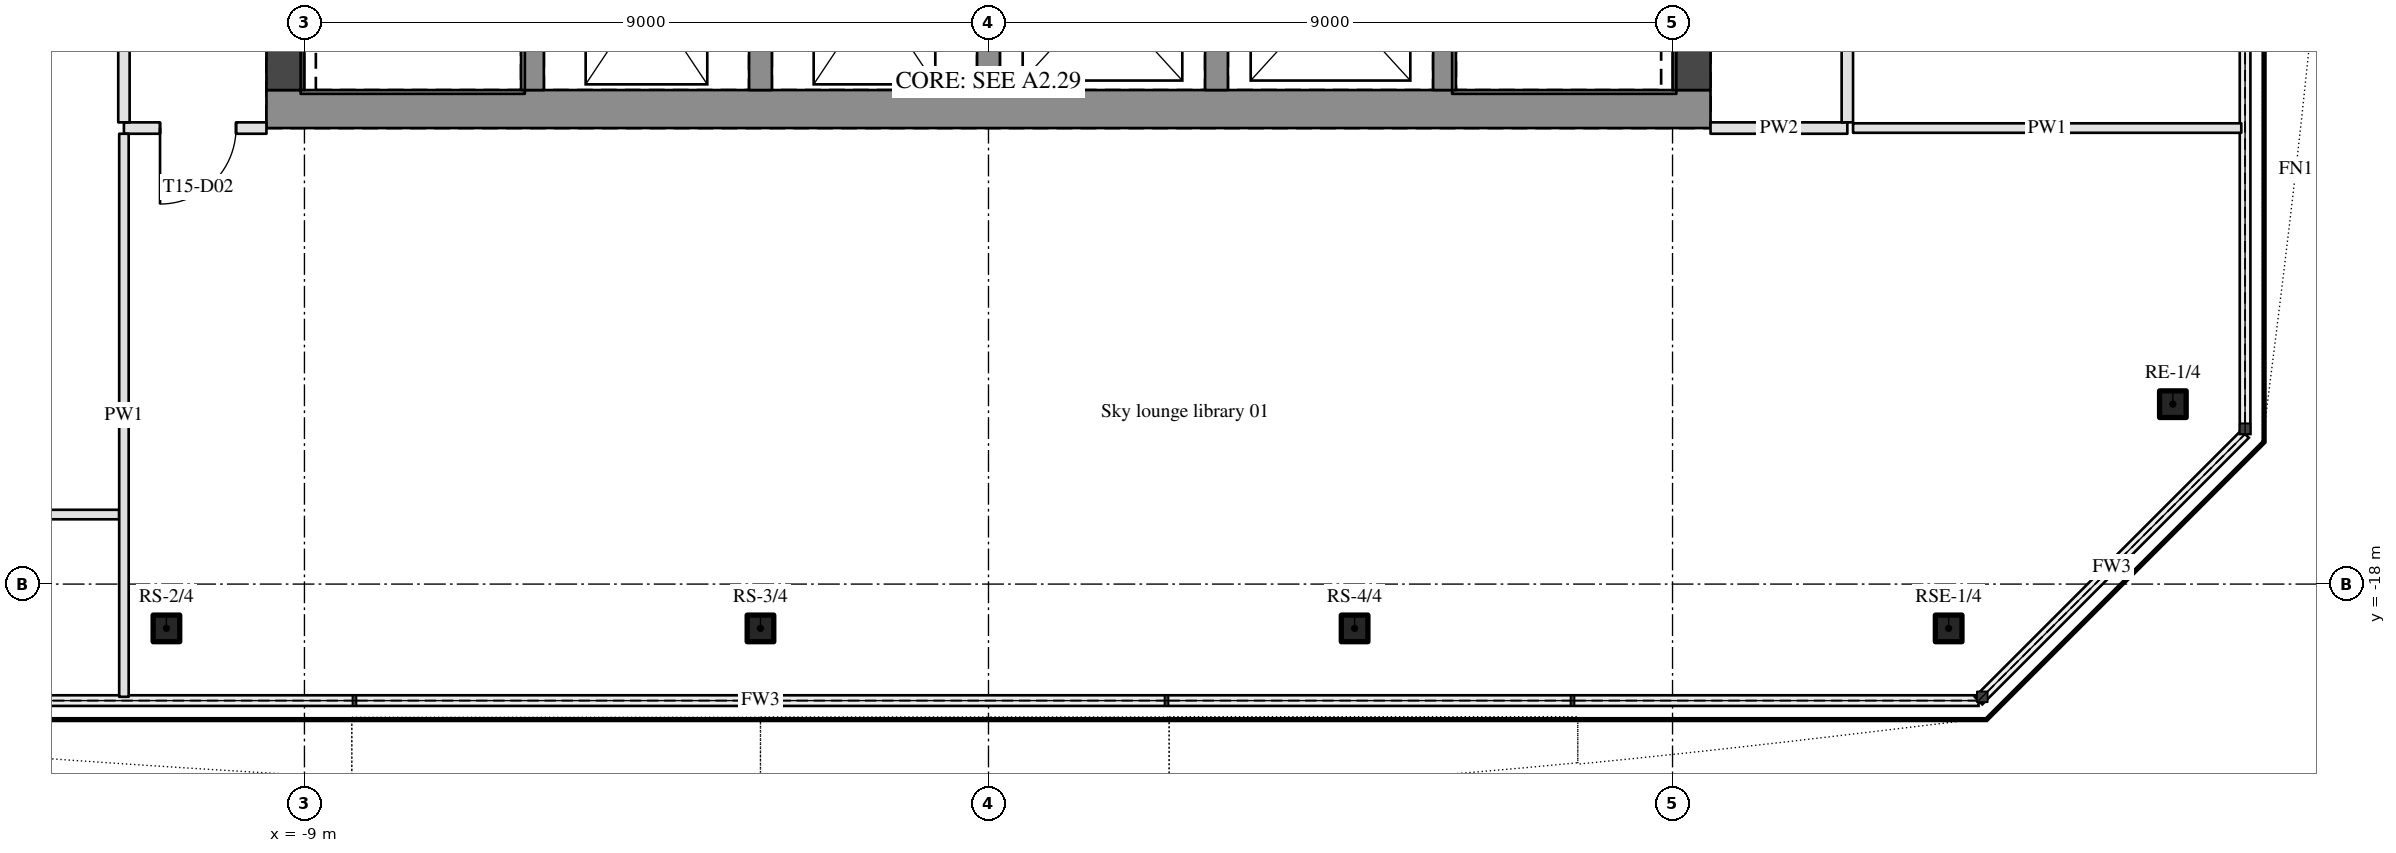
"""IFC4 building model, lengths in metres.
Left out: names, types, materials, properties, quantities, classifications, styles, units other than length and angle.
Written with IfcOpenShell. Run it as: python <this file> out.ifc"""

import sys

from ifc_helpers import new_model, si_unit, direction, frame, frame_2d, origin, origin_2d, place, context, subcontext, project, spatial, rectangle, hollow_rectangle, extrude, element, fill, save


model = new_model("IFC4")
c1 = context("Model", 3, precision=1e-05, world=origin(), true_north=direction((0.0, 1.0)))
c2 = subcontext(c1, "Body", "Model", "MODEL_VIEW")
j1 = project(units=[si_unit("LENGTHUNIT", "METRE"), si_unit("PLANEANGLEUNIT", "RADIAN")], contexts=[c1])
p1 = place(None, origin())
s1 = spatial("IfcSite", under=j1, at=p1, CompositionType="ELEMENT")
p2 = place(p1, origin())
s2 = spatial("IfcBuilding", under=s1, at=p2, CompositionType="ELEMENT")
p3 = place(p2, frame((0.0, 0.0, 206.85)))
s3 = spatial("IfcBuildingStorey", under=s2, at=p3, CompositionType="ELEMENT", Elevation=206.85)
for number, where, z_axis, x_axis in (
    (1, (-10.816, -18.583, 0.0), (0.0, 0.0, 1.0), (1.0, 0.0, 0.0)),
    (2, (-3.0, -18.583, 0.0), (0.0, 0.0, 1.0), (1.0, 0.0, 0.0)),
    (3, (4.817, -18.583, 0.0), (0.0, 0.0, 1.0), (1.0, 0.0, 0.0)),
    (4, (12.633, -18.583, 0.0), (0.0, 0.0, 1.0), (1.0, 0.0, 0.0)),
    (5, (15.583, -15.633, 0.0), (0.0, 0.0, 1.0), (1.0, 0.0, 0.0)),
):
    element("IfcColumn", number, at=place(p3, frame(where, z_axis=z_axis, x_axis=x_axis)), inside=s3, PredefinedType="COLUMN", context=c2, shape_type="SweptSolid", body=[
        extrude(hollow_rectangle(XDim=0.35, YDim=0.35, WallThickness=0.02, InnerFilletRadius=0.03, OuterFilletRadius=0.05, at=origin_2d()), origin(), (0.0, 0.0, 1.0), 3.15),
    ])
p4 = place(p3, frame((-9.5, -11.75, 0.0), z_axis=(0.0, 0.0, 1.0), x_axis=(1.0, 0.0, 0.0)))
e6 = element("IfcWall", 6, at=p4, inside=s3, PredefinedType="SHEAR", context=c2, shape_type="SweptSolid", body=[
    extrude(rectangle(XDim=19.0, YDim=0.5, at=frame_2d((9.5, 0.0))), origin(), (0.0, 0.0, 1.0), 3.15),
])
p5 = place(p3, frame((-9.25, -11.5, 0.0), z_axis=(0.0, 0.0, 1.0), x_axis=(0.0, 1.0, 0.0)))
e7 = element("IfcWall", 7, at=p5, inside=s3, PredefinedType="SHEAR", context=c2, shape_type="SweptSolid", body=[
    extrude(rectangle(XDim=11.65, YDim=0.5, at=frame_2d((5.825, 0.0))), origin(), (0.0, 0.0, 1.0), 3.15),
])
p6 = place(p5, frame((9.4, 0.0, 0.0)))
e8 = element("IfcOpeningElement", 8, at=p6, cuts=e7, PredefinedType="OPENING", context=c2, shape_type="SweptSolid", body=[
    extrude(rectangle(XDim=1.8, YDim=2.1, at=frame_2d((0.9, 1.05))), frame((0.0, 0.26, 0.0), z_axis=(0.0, -1.0, 0.0), x_axis=(1.0, 0.0, 0.0)), (0.0, 0.0, 1.0), 0.52),
])
p7 = place(p3, frame((9.25, -11.5, 0.0), z_axis=(0.0, 0.0, 1.0), x_axis=(0.0, 1.0, 0.0)))
e9 = element("IfcWall", 9, at=p7, inside=s3, PredefinedType="SHEAR", context=c2, shape_type="SweptSolid", body=[
    extrude(rectangle(XDim=11.65, YDim=0.5, at=frame_2d((5.825, 0.0))), origin(), (0.0, 0.0, 1.0), 3.15),
])
p8 = place(p7, frame((9.4, 0.0, 0.0)))
e10 = element("IfcOpeningElement", 10, at=p8, cuts=e9, PredefinedType="OPENING", context=c2, shape_type="SweptSolid", body=[
    extrude(rectangle(XDim=1.8, YDim=2.1, at=frame_2d((0.9, 1.05))), frame((0.0, 0.26, 0.0), z_axis=(0.0, -1.0, 0.0), x_axis=(1.0, 0.0, 0.0)), (0.0, 0.0, 1.0), 0.52),
])
p9 = place(p3, frame((-11.438, -17.085, 0.0), z_axis=(0.0, 0.0, 1.0), x_axis=(-1.0, 0.0, 0.0)))
e11 = element("IfcWall", 11, at=p9, inside=s3, PredefinedType="PARTITIONING", context=c2, shape_type="SweptSolid", body=[
    extrude(rectangle(XDim=6.562, YDim=0.125, at=frame_2d((3.281, 0.0))), origin(), (0.0, 0.0, 1.0), 2.21),
])
p10 = place(p9, frame((2.8, 0.0, 0.0)))
e12 = element("IfcOpeningElement", 12, at=p10, cuts=e11, PredefinedType="OPENING", context=c2, shape_type="SweptSolid", body=[
    extrude(rectangle(XDim=0.9, YDim=2.1, at=frame_2d((0.45, 1.05))), frame((0.0, 0.073, 0.0), z_axis=(0.0, -1.0, 0.0), x_axis=(1.0, 0.0, 0.0)), (0.0, 0.0, 1.0), 0.145),
])
p11 = place(p3, frame((-9.5, -12.0, 0.0), z_axis=(0.0, 0.0, 1.0), x_axis=(-1.0, 0.0, 0.0)))
e13 = element("IfcWall", 13, at=p11, inside=s3, PredefinedType="PARTITIONING", context=c2, shape_type="SweptSolid", body=[
    extrude(rectangle(XDim=1.875, YDim=0.15, at=frame_2d((0.938, 0.0))), origin(), (0.0, 0.0, 1.0), 2.21),
])
p12 = place(p11, frame((0.4, 0.0, 0.0)))
e14 = element("IfcOpeningElement", 14, at=p12, cuts=e13, PredefinedType="OPENING", context=c2, shape_type="SweptSolid", body=[
    extrude(rectangle(XDim=1.0, YDim=2.1, at=frame_2d((0.5, 1.05))), frame((0.0, 0.085, 0.0), z_axis=(0.0, -1.0, 0.0), x_axis=(1.0, 0.0, 0.0)), (0.0, 0.0, 1.0), 0.17),
])
p13 = place(p3, frame((9.5, -12.0, 0.0), z_axis=(0.0, 0.0, 1.0), x_axis=(1.0, 0.0, 0.0)))
e15 = element("IfcWall", 15, at=p13, inside=s3, PredefinedType="PARTITIONING", context=c2, shape_type="SweptSolid", body=[
    extrude(rectangle(XDim=1.8, YDim=0.15, at=frame_2d((0.9, 0.0))), origin(), (0.0, 0.0, 1.0), 2.21),
])
p14 = place(p3, frame((11.375, -12.0, 0.0), z_axis=(0.0, 0.0, 1.0), x_axis=(1.0, 0.0, 0.0)))
e16 = element("IfcWall", 16, at=p14, inside=s3, PredefinedType="PARTITIONING", context=c2, shape_type="SweptSolid", body=[
    extrude(rectangle(XDim=5.108, YDim=0.125, at=frame_2d((2.554, 0.0))), origin(), (0.0, 0.0, 1.0), 2.21),
])
p15 = place(p3, frame((-11.375, -19.483, 0.0), z_axis=(0.0, 0.0, 1.0), x_axis=(0.0, 1.0, 0.0)))
e17 = element("IfcWall", 17, at=p15, inside=s3, PredefinedType="PARTITIONING", context=c2, shape_type="SweptSolid", body=[
    extrude(rectangle(XDim=7.408, YDim=0.125, at=frame_2d((3.704, 0.0))), origin(), (0.0, 0.0, 1.0), 2.21),
])
p16 = place(p3, frame((-11.375, -11.925, 0.0), z_axis=(0.0, 0.0, 1.0), x_axis=(0.0, 1.0, 0.0)))
e18 = element("IfcWall", 18, at=p16, inside=s3, PredefinedType="PARTITIONING", context=c2, shape_type="SweptSolid", body=[
    extrude(rectangle(XDim=23.25, YDim=0.15, at=frame_2d((11.625, 0.0))), origin(), (0.0, 0.0, 1.0), 2.21),
])
p17 = place(p16, frame((1.262, 0.0, 0.0)))
e19 = element("IfcOpeningElement", 19, at=p17, cuts=e18, PredefinedType="OPENING", context=c2, shape_type="SweptSolid", body=[
    extrude(rectangle(XDim=1.0, YDim=2.1, at=frame_2d((0.5, 1.05))), frame((0.0, 0.085, 0.0), z_axis=(0.0, -1.0, 0.0), x_axis=(1.0, 0.0, 0.0)), (0.0, 0.0, 1.0), 0.17),
])
p18 = place(p16, frame((18.583, 0.0, 0.0)))
e20 = element("IfcOpeningElement", 20, at=p18, cuts=e18, PredefinedType="OPENING", context=c2, shape_type="SweptSolid", body=[
    extrude(rectangle(XDim=1.0, YDim=2.1, at=frame_2d((0.5, 1.05))), frame((0.0, 0.085, 0.0), z_axis=(0.0, -1.0, 0.0), x_axis=(1.0, 0.0, 0.0)), (0.0, 0.0, 1.0), 0.17),
])
p19 = place(p3, frame((-6.0, -11.5, 0.0), z_axis=(0.0, 0.0, 1.0), x_axis=(0.0, 1.0, 0.0)))
e21 = element("IfcWall", 21, at=p19, inside=s3, PredefinedType="SHEAR", context=c2, shape_type="SweptSolid", body=[
    extrude(rectangle(XDim=6.4, YDim=0.3, at=frame_2d((3.2, 0.0))), origin(), (0.0, 0.0, 1.0), 3.15),
])
p20 = place(p19, frame((5.15, 0.0, 0.0)))
e22 = element("IfcOpeningElement", 22, at=p20, cuts=e21, PredefinedType="OPENING", context=c2, shape_type="SweptSolid", body=[
    extrude(rectangle(XDim=1.1, YDim=2.1, at=frame_2d((0.55, 1.05))), frame((0.0, 0.16, 0.0), z_axis=(0.0, -1.0, 0.0), x_axis=(1.0, 0.0, 0.0)), (0.0, 0.0, 1.0), 0.32),
])
for number, where, z_axis, x_axis in (
    (23, (-3.0, -11.5, 0.0), (0.0, 0.0, 1.0), (0.0, 1.0, 0.0)),
    (24, (0.0, -11.5, 0.0), (0.0, 0.0, 1.0), (0.0, 1.0, 0.0)),
    (25, (3.0, -11.5, 0.0), (0.0, 0.0, 1.0), (0.0, 1.0, 0.0)),
):
    element("IfcWall", number, at=place(p3, frame(where, z_axis=z_axis, x_axis=x_axis)), inside=s3, PredefinedType="SHEAR", context=c2, shape_type="SweptSolid", body=[
        extrude(rectangle(XDim=2.4, YDim=0.3, at=frame_2d((1.2, 0.0))), origin(), (0.0, 0.0, 1.0), 3.15),
    ])
p21 = place(p3, frame((6.0, -5.1, 0.0), z_axis=(0.0, 0.0, 1.0), x_axis=(0.0, -1.0, 0.0)))
e26 = element("IfcWall", 26, at=p21, inside=s3, PredefinedType="SHEAR", context=c2, shape_type="SweptSolid", body=[
    extrude(rectangle(XDim=6.4, YDim=0.3, at=frame_2d((3.2, 0.0))), origin(), (0.0, 0.0, 1.0), 3.15),
])
p22 = place(p21, frame((0.15, 0.0, 0.0)))
e27 = element("IfcOpeningElement", 27, at=p22, cuts=e26, PredefinedType="OPENING", context=c2, shape_type="SweptSolid", body=[
    extrude(rectangle(XDim=1.1, YDim=2.1, at=frame_2d((0.55, 1.05))), frame((0.0, 0.16, 0.0), z_axis=(0.0, -1.0, 0.0), x_axis=(1.0, 0.0, 0.0)), (0.0, 0.0, 1.0), 0.32),
])
p23 = place(p3, frame((11.3, 11.225, 0.0), z_axis=(0.0, 0.0, 1.0), x_axis=(0.0, -1.0, 0.0)))
e28 = element("IfcWall", 28, at=p23, inside=s3, PredefinedType="PARTITIONING", context=c2, shape_type="SweptSolid", body=[
    extrude(rectangle(XDim=23.15, YDim=0.15, at=frame_2d((11.575, 0.0))), origin(), (0.0, 0.0, 1.0), 2.21),
])
p24 = place(p23, frame((12.262, 0.0, 0.0)))
e29 = element("IfcOpeningElement", 29, at=p24, cuts=e28, PredefinedType="OPENING", context=c2, shape_type="SweptSolid", body=[
    extrude(rectangle(XDim=1.0, YDim=2.1, at=frame_2d((0.5, 1.05))), frame((0.0, 0.085, 0.0), z_axis=(0.0, -1.0, 0.0), x_axis=(1.0, 0.0, 0.0)), (0.0, 0.0, 1.0), 0.17),
])
p25 = place(p12, origin())
e30 = element("IfcDoor", 30, at=p25, inside=s3, OperationType="SINGLE_SWING_RIGHT", PredefinedType="DOOR", context=c2, shape_type="SweptSolid", body=[
    extrude(rectangle(XDim=1.0, YDim=2.1, at=frame_2d((0.5, 1.05))), frame((0.0, 0.025, 0.0), z_axis=(0.0, -1.0, 0.0), x_axis=(1.0, 0.0, 0.0)), (0.0, 0.0, 1.0), 0.05),
])
fill(e14, e30)
save(model, sys.argv[1])
